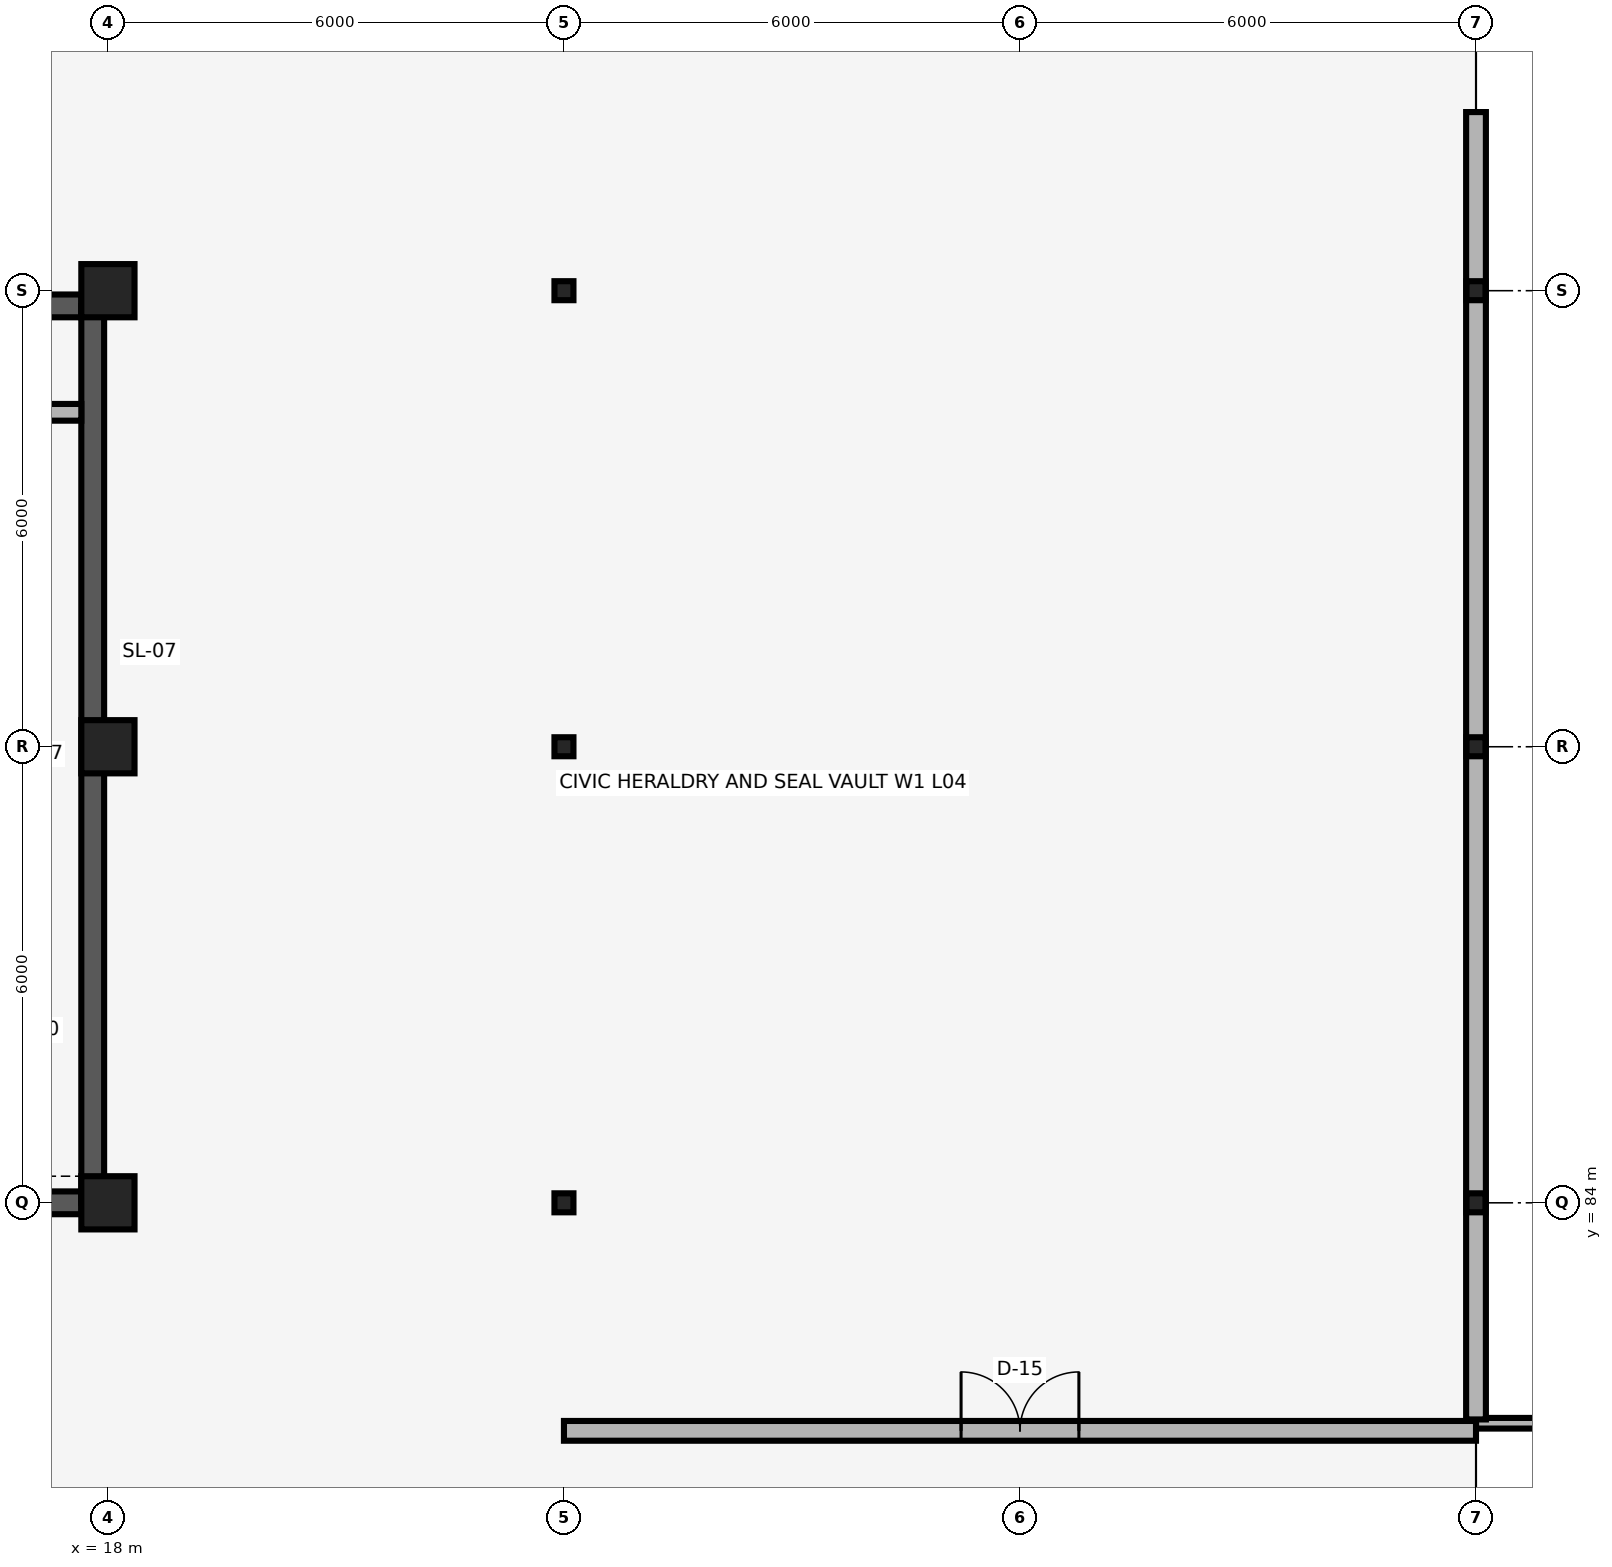
"""IFC4 building model, lengths in metres.
Left out: names, types, materials, properties, quantities, classifications, styles, units other than length and angle.
Written with IfcOpenShell. Run it as: python <this file> out.ifc"""

import sys

from ifc_helpers import new_model, si_unit, direction, frame, frame_2d, origin, origin_2d, place, context, subcontext, project, spatial, rectangle, i_section, extrude, element, fill, save


model = new_model("IFC4")
c1 = context("Model", 3, precision=1e-05, world=origin(), true_north=direction((0.0, 1.0)))
c2 = subcontext(c1, "Body", "Model", "MODEL_VIEW")
j1 = project(units=[si_unit("LENGTHUNIT", "METRE"), si_unit("PLANEANGLEUNIT", "RADIAN")], contexts=[c1])
p1 = place(None, origin())
s1 = spatial("IfcSite", under=j1, at=p1, CompositionType="ELEMENT")
p2 = place(p1, origin())
s2 = spatial("IfcBuilding", under=s1, at=p2, CompositionType="ELEMENT")
p3 = place(p2, frame((0.0, 0.0, 16.5)))
s3 = spatial("IfcBuildingStorey", under=s2, at=p3, CompositionType="ELEMENT", Elevation=16.5)
p4 = place(p3, frame((18.0, 84.0, 0.0), z_axis=(0.0, 0.0, 1.0), x_axis=(1.0, 0.0, 0.0)))
e1 = element("IfcColumn", 1, at=p4, inside=s3, PredefinedType="COLUMN", context=c2, shape_type="SweptSolid", body=[
    extrude(rectangle(XDim=0.7, YDim=0.7, at=origin_2d()), origin(), (0.0, 0.0, 1.0), 4.0),
])
p5 = place(p3, frame((24.0, 84.0, 0.0), z_axis=(0.0, 0.0, 1.0), x_axis=(1.0, 0.0, 0.0)))
e2 = element("IfcColumn", 2, at=p5, inside=s3, PredefinedType="COLUMN", context=c2, shape_type="SweptSolid", body=[
    extrude(i_section(OverallWidth=0.25, OverallDepth=0.25, WebThickness=0.009, FlangeThickness=0.014, FilletRadius=0.016, at=origin_2d()), origin(), (0.0, 0.0, 1.0), 4.0),
])
p6 = place(p3, frame((36.0, 84.0, 0.0), z_axis=(0.0, 0.0, 1.0), x_axis=(1.0, 0.0, 0.0)))
e3 = element("IfcColumn", 3, at=p6, inside=s3, PredefinedType="COLUMN", context=c2, shape_type="SweptSolid", body=[
    extrude(i_section(OverallWidth=0.25, OverallDepth=0.25, WebThickness=0.009, FlangeThickness=0.014, FilletRadius=0.016, at=origin_2d()), origin(), (0.0, 0.0, 1.0), 4.5),
])
p7 = place(p3, frame((18.0, 90.0, 0.0), z_axis=(0.0, 0.0, 1.0), x_axis=(1.0, 0.0, 0.0)))
e4 = element("IfcColumn", 4, at=p7, inside=s3, PredefinedType="COLUMN", context=c2, shape_type="SweptSolid", body=[
    extrude(rectangle(XDim=0.7, YDim=0.7, at=origin_2d()), origin(), (0.0, 0.0, 1.0), 4.0),
])
p8 = place(p3, frame((24.0, 90.0, 0.0), z_axis=(0.0, 0.0, 1.0), x_axis=(1.0, 0.0, 0.0)))
e5 = element("IfcColumn", 5, at=p8, inside=s3, PredefinedType="COLUMN", context=c2, shape_type="SweptSolid", body=[
    extrude(i_section(OverallWidth=0.25, OverallDepth=0.25, WebThickness=0.009, FlangeThickness=0.014, FilletRadius=0.016, at=origin_2d()), origin(), (0.0, 0.0, 1.0), 4.0),
])
p9 = place(p3, frame((36.0, 90.0, 0.0), z_axis=(0.0, 0.0, 1.0), x_axis=(1.0, 0.0, 0.0)))
e6 = element("IfcColumn", 6, at=p9, inside=s3, PredefinedType="COLUMN", context=c2, shape_type="SweptSolid", body=[
    extrude(i_section(OverallWidth=0.25, OverallDepth=0.25, WebThickness=0.009, FlangeThickness=0.014, FilletRadius=0.016, at=origin_2d()), origin(), (0.0, 0.0, 1.0), 4.5),
])
p10 = place(p3, frame((18.0, 96.0, 0.0), z_axis=(0.0, 0.0, 1.0), x_axis=(1.0, 0.0, 0.0)))
e7 = element("IfcColumn", 7, at=p10, inside=s3, PredefinedType="COLUMN", context=c2, shape_type="SweptSolid", body=[
    extrude(rectangle(XDim=0.7, YDim=0.7, at=origin_2d()), origin(), (0.0, 0.0, 1.0), 4.0),
])
p11 = place(p3, frame((24.0, 96.0, 0.0), z_axis=(0.0, 0.0, 1.0), x_axis=(1.0, 0.0, 0.0)))
e8 = element("IfcColumn", 8, at=p11, inside=s3, PredefinedType="COLUMN", context=c2, shape_type="SweptSolid", body=[
    extrude(i_section(OverallWidth=0.25, OverallDepth=0.25, WebThickness=0.009, FlangeThickness=0.014, FilletRadius=0.016, at=origin_2d()), origin(), (0.0, 0.0, 1.0), 4.0),
])
p12 = place(p3, frame((36.0, 96.0, 0.0), z_axis=(0.0, 0.0, 1.0), x_axis=(1.0, 0.0, 0.0)))
e9 = element("IfcColumn", 9, at=p12, inside=s3, PredefinedType="COLUMN", context=c2, shape_type="SweptSolid", body=[
    extrude(i_section(OverallWidth=0.25, OverallDepth=0.25, WebThickness=0.009, FlangeThickness=0.014, FilletRadius=0.016, at=origin_2d()), origin(), (0.0, 0.0, 1.0), 4.5),
])
p13 = place(p3, frame((12.35, 84.0, 0.0), z_axis=(0.0, 0.0, 1.0), x_axis=(1.0, 0.0, 0.0)))
e10 = element("IfcWall", 10, at=p13, inside=s3, PredefinedType="SHEAR", context=c2, shape_type="SweptSolid", body=[
    extrude(rectangle(XDim=5.3, YDim=0.3, at=frame_2d((2.65, 0.0))), origin(), (0.0, 0.0, 1.0), 4.0),
])
p14 = place(p13, frame((1.925, 0.0, 0.0)))
e11 = element("IfcOpeningElement", 11, at=p14, cuts=e10, PredefinedType="OPENING", context=c2, shape_type="SweptSolid", body=[
    extrude(rectangle(XDim=1.45, YDim=2.25, at=frame_2d((0.725, 1.125))), frame((0.0, 0.165, 0.0), z_axis=(0.0, -1.0, 0.0), x_axis=(1.0, 0.0, 0.0)), (0.0, 0.0, 1.0), 0.33),
])
p15 = place(p3, frame((12.35, 95.8, 0.0), z_axis=(0.0, 0.0, 1.0), x_axis=(1.0, 0.0, 0.0)))
e12 = element("IfcWall", 12, at=p15, inside=s3, PredefinedType="SHEAR", context=c2, shape_type="SweptSolid", body=[
    extrude(rectangle(XDim=5.3, YDim=0.3, at=frame_2d((2.65, 0.0))), origin(), (0.0, 0.0, 1.0), 4.0),
])
p16 = place(p3, frame((17.8, 84.0, 0.0), z_axis=(0.0, 0.0, 1.0), x_axis=(0.0, 1.0, 0.0)))
e13 = element("IfcWall", 13, at=p16, inside=s3, PredefinedType="SHEAR", context=c2, shape_type="SweptSolid", body=[
    extrude(rectangle(XDim=11.8, YDim=0.3, at=frame_2d((5.9, 0.0))), origin(), (0.0, 0.0, 1.0), 4.0),
])
p17 = place(p3, frame((16.55, 94.4, 0.0), z_axis=(0.0, 0.0, 1.0), x_axis=(1.0, 0.0, 0.0)))
e14 = element("IfcWall", 14, at=p17, inside=s3, PredefinedType="PARTITIONING", context=c2, shape_type="SweptSolid", body=[
    extrude(rectangle(XDim=1.1, YDim=0.22, at=frame_2d((0.55, 0.0))), origin(), (0.0, 0.0, 1.0), 4.0),
])
p18 = place(p3, frame((36.0, 81.1, 0.0), z_axis=(0.0, 0.0, 1.0), x_axis=(1.0, 0.0, 0.0)))
e15 = element("IfcWall", 15, at=p18, inside=s3, PredefinedType="PARTITIONING", context=c2, shape_type="SweptSolid", body=[
    extrude(rectangle(XDim=12.0, YDim=0.14, at=frame_2d((6.0, 0.0))), origin(), (0.0, 0.0, 1.0), 4.0),
])
p19 = place(p18, frame((5.475, 0.0, 0.0)))
e16 = element("IfcOpeningElement", 16, at=p19, cuts=e15, PredefinedType="OPENING", context=c2, shape_type="SweptSolid", body=[
    extrude(rectangle(XDim=1.05, YDim=2.25, at=frame_2d((0.525, 1.125))), frame((0.0, 0.085, 0.0), z_axis=(0.0, -1.0, 0.0), x_axis=(1.0, 0.0, 0.0)), (0.0, 0.0, 1.0), 0.17),
])
p20 = place(p3, frame((24.0, 81.0, 0.0), z_axis=(0.0, 0.0, 1.0), x_axis=(1.0, 0.0, 0.0)))
e17 = element("IfcWall", 17, at=p20, inside=s3, PredefinedType="PARTITIONING", context=c2, shape_type="SweptSolid", body=[
    extrude(rectangle(XDim=12.0, YDim=0.26, at=frame_2d((6.0, 0.0))), origin(), (0.0, 0.0, 1.0), 4.0),
])
p21 = place(p20, frame((5.225, 0.0, 0.0)))
e18 = element("IfcOpeningElement", 18, at=p21, cuts=e17, PredefinedType="OPENING", context=c2, shape_type="SweptSolid", body=[
    extrude(rectangle(XDim=1.55, YDim=2.3, at=frame_2d((0.775, 1.15))), frame((0.0, 0.145, 0.0), z_axis=(0.0, -1.0, 0.0), x_axis=(1.0, 0.0, 0.0)), (0.0, 0.0, 1.0), 0.29),
])
p22 = place(p3, frame((36.0, 81.15, 0.0), z_axis=(0.0, 0.0, 1.0), x_axis=(0.0, 1.0, 0.0)))
e19 = element("IfcWall", 19, at=p22, inside=s3, PredefinedType="PARTITIONING", context=c2, shape_type="SweptSolid", body=[
    extrude(rectangle(XDim=17.2, YDim=0.26, at=frame_2d((8.6, 0.0))), origin(), (0.0, 0.0, 1.0), 3.56),
])
p23 = place(p21, origin())
e20 = element("IfcDoor", 20, at=p23, inside=s3, OperationType="DOUBLE_DOOR_SINGLE_SWING", PredefinedType="DOOR", context=c2, shape_type="SweptSolid", body=[
    extrude(rectangle(XDim=1.55, YDim=2.3, at=frame_2d((0.775, 1.15))), frame((0.0, 0.025, 0.0), z_axis=(0.0, -1.0, 0.0), x_axis=(1.0, 0.0, 0.0)), (0.0, 0.0, 1.0), 0.05),
])
fill(e18, e20)
save(model, sys.argv[1])
